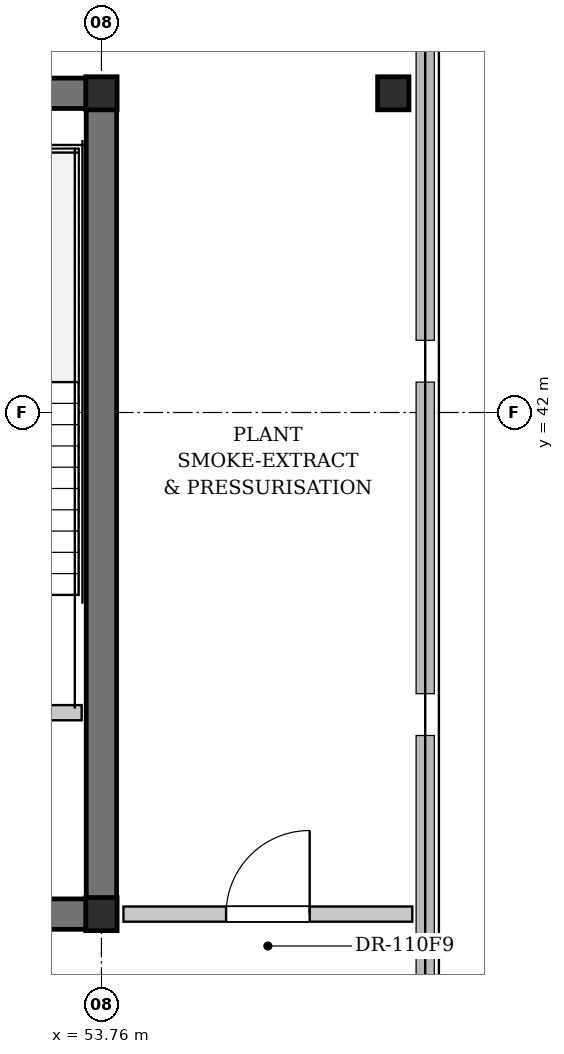
"""IFC4 building model, lengths in metres.
Left out: names, types, materials, properties, quantities, classifications, styles, units other than length and angle.
Written with IfcOpenShell. Run it as: python <this file> out.ifc"""

import sys

from ifc_helpers import new_model, si_unit, direction, frame, frame_2d, origin, origin_2d, place, context, subcontext, project, spatial, rectangle, i_section, extrude, element, fill, save


model = new_model("IFC4")
c1 = context("Model", 3, precision=1e-05, world=origin(), true_north=direction((0.0, 1.0)))
c2 = subcontext(c1, "Body", "Model", "MODEL_VIEW")
j1 = project(units=[si_unit("LENGTHUNIT", "METRE"), si_unit("PLANEANGLEUNIT", "RADIAN")], contexts=[c1])
p1 = place(None, origin())
s1 = spatial("IfcSite", under=j1, at=p1, CompositionType="ELEMENT")
p2 = place(p1, origin())
s2 = spatial("IfcBuilding", under=s1, at=p2, CompositionType="ELEMENT")
p3 = place(p2, frame((0.0, 0.0, 255.2)))
s3 = spatial("IfcBuildingStorey", under=s2, at=p3, CompositionType="ELEMENT", Elevation=255.2)
p4 = place(p3, frame((22.84, 46.2, 0.0), z_axis=(0.0, 0.0, 1.0), x_axis=(1.0, 0.0, 0.0)))
e1 = element("IfcWall", 1, at=p4, inside=s3, PredefinedType="SHEAR", context=c2, shape_type="SweptSolid", body=[
    extrude(rectangle(XDim=31.12, YDim=0.4, at=frame_2d((15.56, 0.0))), origin(), (0.0, 0.0, 1.0), 3.48),
])
p5 = place(p3, frame((52.45, 35.4, 0.0), z_axis=(0.0, 0.0, 1.0), x_axis=(1.0, 0.0, 0.0)))
e2 = element("IfcWall", 2, at=p5, inside=s3, PredefinedType="SHEAR", context=c2, shape_type="SweptSolid", body=[
    extrude(rectangle(XDim=1.51, YDim=0.4, at=frame_2d((0.755, 0.0))), origin(), (0.0, 0.0, 1.0), 3.48),
])
p6 = place(p3, frame((53.76, 35.6, 0.0), z_axis=(0.0, 0.0, 1.0), x_axis=(0.0, 1.0, 0.0)))
e3 = element("IfcWall", 3, at=p6, inside=s3, PredefinedType="SHEAR", context=c2, shape_type="SweptSolid", body=[
    extrude(rectangle(XDim=10.4, YDim=0.4, at=frame_2d((5.2, 0.0))), origin(), (0.0, 0.0, 1.0), 3.48),
])
for number, where, z_axis, x_axis in (
    (4, (53.76, 35.4, 0.0), (0.0, 0.0, 1.0), (1.0, 0.0, 0.0)),
    (5, (53.76, 46.2, 0.0), (0.0, 0.0, 1.0), (1.0, 0.0, 0.0)),
    (6, (57.6, 46.2, 0.0), (0.0, 0.0, 1.0), (1.0, 0.0, 0.0)),
):
    element("IfcColumn", number, at=place(p3, frame(where, z_axis=z_axis, x_axis=x_axis)), inside=s3, PredefinedType="COLUMN", context=c2, shape_type="SweptSolid", body=[
        extrude(i_section(OverallWidth=0.412, OverallDepth=0.435, WebThickness=0.036, FlangeThickness=0.058, FilletRadius=0.015, at=origin_2d()), origin(), (0.0, 0.0, 1.0), 3.9),
    ])
p7 = place(p3, frame((49.78, 38.05, 0.0), z_axis=(0.0, 0.0, 1.0), x_axis=(1.0, 0.0, 0.0)))
e7 = element("IfcWall", 7, at=p7, inside=s3, PredefinedType="PARTITIONING", context=c2, shape_type="SweptSolid", body=[
    extrude(rectangle(XDim=3.72, YDim=0.2, at=frame_2d((1.86, 0.0))), origin(), (0.0, 0.0, 1.0), 3.48),
])
p8 = place(p7, frame((1.436, 0.0, 0.0)))
e8 = element("IfcOpeningElement", 8, at=p8, cuts=e7, PredefinedType="OPENING", context=c2, shape_type="SweptSolid", body=[
    extrude(rectangle(XDim=1.1, YDim=2.15, at=frame_2d((0.55, 1.075))), frame((0.0, 0.11, 0.0), z_axis=(0.0, -1.0, 0.0), x_axis=(1.0, 0.0, 0.0)), (0.0, 0.0, 1.0), 0.22),
])
p9 = place(p3, frame((54.05, 35.4, 0.0), z_axis=(0.0, 0.0, 1.0), x_axis=(1.0, 0.0, 0.0)))
e9 = element("IfcWall", 9, at=p9, inside=s3, PredefinedType="PARTITIONING", context=c2, shape_type="SweptSolid", body=[
    extrude(rectangle(XDim=3.8, YDim=0.2, at=frame_2d((1.9, 0.0))), origin(), (0.0, 0.0, 1.0), 3.48),
])
p10 = place(p9, frame((1.35, 0.0, 0.0)))
e10 = element("IfcOpeningElement", 10, at=p10, cuts=e9, PredefinedType="OPENING", context=c2, shape_type="SweptSolid", body=[
    extrude(rectangle(XDim=1.1, YDim=2.15, at=frame_2d((0.55, 1.075))), frame((0.0, 0.11, 0.0), z_axis=(0.0, -1.0, 0.0), x_axis=(1.0, 0.0, 0.0)), (0.0, 0.0, 1.0), 0.22),
])
p11 = place(p10, origin())
e11 = element("IfcDoor", 11, at=p11, inside=s3, OperationType="SINGLE_SWING_RIGHT", PredefinedType="DOOR", context=c2, shape_type="SweptSolid", body=[
    extrude(rectangle(XDim=1.1, YDim=2.15, at=frame_2d((0.55, 1.075))), frame((0.0, 0.025, 0.0), z_axis=(0.0, -1.0, 0.0), x_axis=(1.0, 0.0, 0.0)), (0.0, 0.0, 1.0), 0.05),
])
fill(e10, e11)
save(model, sys.argv[1])
